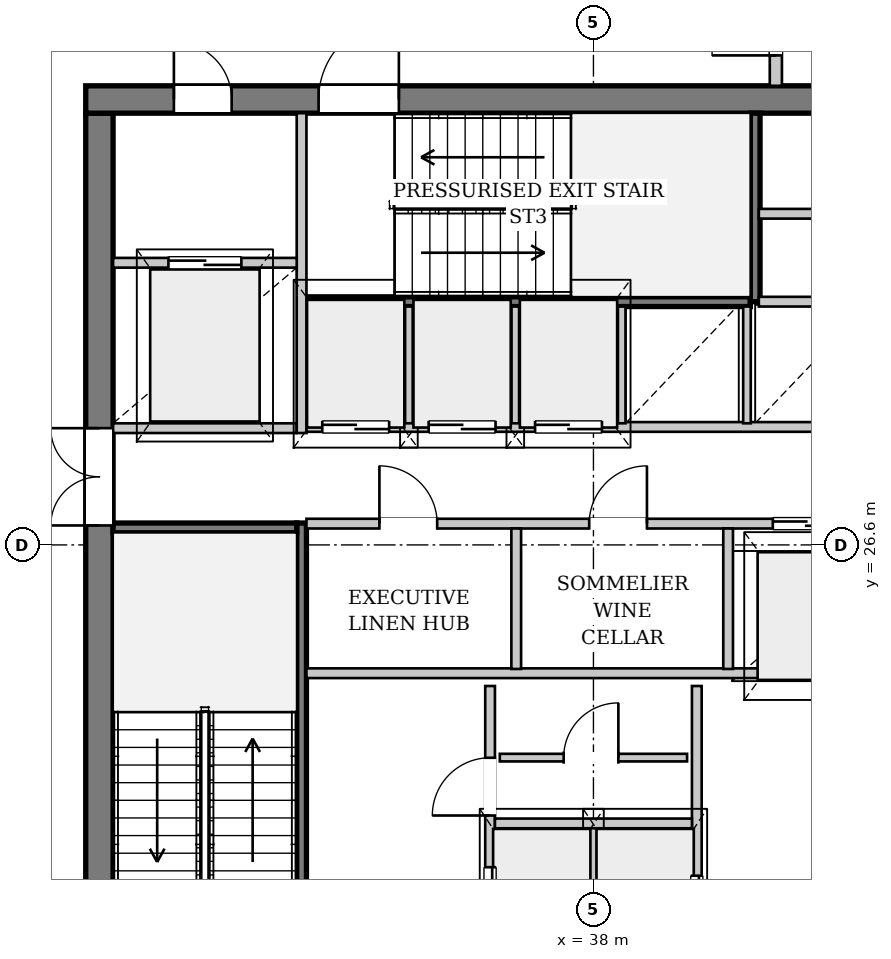
"""IFC4 building model, lengths in metres.
Left out: names, types, materials, properties, quantities, classifications, styles, units other than length and angle.
Written with IfcOpenShell. Run it as: python <this file> out.ifc"""

import sys

from ifc_helpers import new_model, si_unit, direction, frame, frame_2d, origin, place, context, subcontext, project, spatial, rectangle, extrude, source, transform, mapped, element, fill, save


model = new_model("IFC4")
c1 = context("Model", 3, precision=1e-05, world=origin(), true_north=direction((0.0, 1.0)))
c2 = subcontext(c1, "Body", "Model", "MODEL_VIEW")
j1 = project(units=[si_unit("LENGTHUNIT", "METRE"), si_unit("PLANEANGLEUNIT", "RADIAN")], contexts=[c1])
p1 = place(None, origin())
s1 = spatial("IfcSite", under=j1, at=p1, CompositionType="ELEMENT")
p2 = place(p1, origin())
s2 = spatial("IfcBuilding", under=s1, at=p2, CompositionType="ELEMENT")
p3 = place(p2, frame((0.0, 0.0, 234.5)))
s3 = spatial("IfcBuildingStorey", under=s2, at=p3, CompositionType="ELEMENT", Elevation=234.5)
p4 = place(p3, frame((15.502, 29.99, 0.0), z_axis=(0.0, 0.0, 1.0), x_axis=(0.862571881981, 0.505934529772, 0.0)))
e1 = element("IfcWall", 1, at=p4, inside=s3, PredefinedType="SOLIDWALL", context=c2, shape_type="SweptSolid", body=[
    extrude(rectangle(XDim=22.318, YDim=0.38, at=frame_2d((11.159, 0.0))), origin(), (0.0, 0.0, 1.0), 2.872),
])
p5 = place(p4, frame((5.149, 0.0, 0.502)))
e2 = element("IfcOpeningElement", 2, at=p5, cuts=e1, PredefinedType="OPENING", context=c2, shape_type="SweptSolid", body=[
    extrude(rectangle(XDim=2.2, YDim=2.25, at=frame_2d((1.1, 1.125))), frame((0.0, 0.2, 0.0), z_axis=(0.0, -1.0, 0.0), x_axis=(1.0, 0.0, 0.0)), (0.0, 0.0, 1.0), 0.4),
])
p6 = place(p4, frame((15.419, 0.0, 0.502)))
e3 = element("IfcOpeningElement", 3, at=p6, cuts=e1, PredefinedType="OPENING", context=c2, shape_type="SweptSolid", body=[
    extrude(rectangle(XDim=2.2, YDim=2.25, at=frame_2d((1.1, 1.125))), frame((0.0, 0.2, 0.0), z_axis=(0.0, -1.0, 0.0), x_axis=(1.0, 0.0, 0.0)), (0.0, 0.0, 1.0), 0.4),
])
p7 = place(p3, frame((29.875, 19.5, 0.0), z_axis=(0.0, 0.0, 1.0), x_axis=(0.0, 1.0, 0.0)))
e4 = element("IfcWall", 4, at=p7, inside=s3, PredefinedType="SHEAR", context=c2, shape_type="SweptSolid", body=[
    extrude(rectangle(XDim=14.2, YDim=0.45, at=frame_2d((7.1, 0.0))), origin(), (0.0, 0.0, 1.0), 3.38),
])
p8 = place(p7, frame((7.42, 0.0, 0.0)))
e5 = element("IfcOpeningElement", 5, at=p8, cuts=e4, PredefinedType="OPENING", context=c2, shape_type="SweptSolid", body=[
    extrude(rectangle(XDim=1.6, YDim=2.2, at=frame_2d((0.8, 1.1))), frame((0.0, 0.235, 0.0), z_axis=(0.0, -1.0, 0.0), x_axis=(1.0, 0.0, 0.0)), (0.0, 0.0, 1.0), 0.47),
])
p9 = place(p3, frame((29.65, 33.925, 0.0), z_axis=(0.0, 0.0, 1.0), x_axis=(1.0, 0.0, 0.0)))
e6 = element("IfcWall", 6, at=p9, inside=s3, PredefinedType="SHEAR", context=c2, shape_type="SweptSolid", body=[
    extrude(rectangle(XDim=16.7, YDim=0.45, at=frame_2d((8.35, 0.0))), origin(), (0.0, 0.0, 1.0), 3.38),
])
p10 = place(p9, frame((1.45, 0.0, 0.0)))
e7 = element("IfcOpeningElement", 7, at=p10, cuts=e6, PredefinedType="OPENING", context=c2, shape_type="SweptSolid", body=[
    extrude(rectangle(XDim=0.95, YDim=2.1, at=frame_2d((0.475, 1.05))), frame((0.0, 0.235, 0.0), z_axis=(0.0, -1.0, 0.0), x_axis=(1.0, 0.0, 0.0)), (0.0, 0.0, 1.0), 0.47),
])
p11 = place(p9, frame((3.83, 0.0, 0.0)))
e8 = element("IfcOpeningElement", 8, at=p11, cuts=e6, PredefinedType="OPENING", context=c2, shape_type="SweptSolid", body=[
    extrude(rectangle(XDim=1.32, YDim=2.2, at=frame_2d((0.66, 1.1))), frame((0.0, 0.235, 0.0), z_axis=(0.0, -1.0, 0.0), x_axis=(1.0, 0.0, 0.0)), (0.0, 0.0, 1.0), 0.47),
])
p12 = place(p3, frame((33.2, 19.5, 0.0), z_axis=(0.0, 0.0, 1.0), x_axis=(0.0, 1.0, 0.0)))
e9 = element("IfcWall", 9, at=p12, inside=s3, PredefinedType="PARTITIONING", context=c2, shape_type="SweptSolid", body=[
    extrude(rectangle(XDim=7.46, YDim=0.16, at=frame_2d((3.73, 0.0))), origin(), (0.0, 0.0, 1.0), 3.38),
])
p13 = place(p12, frame((0.08, 0.0, 0.0)))
e10 = element("IfcOpeningElement", 10, at=p13, cuts=e9, PredefinedType="OPENING", context=c2, shape_type="SweptSolid", body=[
    extrude(rectangle(XDim=1.32, YDim=2.2, at=frame_2d((0.66, 1.1))), frame((0.0, 0.09, 0.0), z_axis=(0.0, -1.0, 0.0), x_axis=(1.0, 0.0, 0.0)), (0.0, 0.0, 1.0), 0.18),
])
p14 = place(p3, frame((30.1, 26.88, 0.0), z_axis=(0.0, 0.0, 1.0), x_axis=(1.0, 0.0, 0.0)))
e11 = element("IfcWall", 11, at=p14, inside=s3, PredefinedType="PARTITIONING", context=c2, shape_type="SweptSolid", body=[
    extrude(rectangle(XDim=3.02, YDim=0.16, at=frame_2d((1.51, 0.0))), origin(), (0.0, 0.0, 1.0), 3.38),
])
p15 = place(p3, frame((33.28, 30.6, 0.0), z_axis=(0.0, 0.0, 1.0), x_axis=(1.0, 0.0, 0.0)))
e12 = element("IfcWall", 12, at=p15, inside=s3, PredefinedType="PARTITIONING", context=c2, shape_type="SweptSolid", body=[
    extrude(rectangle(XDim=7.3, YDim=0.16, at=frame_2d((3.65, 0.0))), origin(), (0.0, 0.0, 1.0), 3.38),
])
p16 = place(p3, frame((40.66, 30.6, 0.0), z_axis=(0.0, 0.0, 1.0), x_axis=(0.0, 1.0, 0.0)))
e13 = element("IfcWall", 13, at=p16, inside=s3, PredefinedType="PARTITIONING", context=c2, shape_type="SweptSolid", body=[
    extrude(rectangle(XDim=3.1, YDim=0.16, at=frame_2d((1.55, 0.0))), origin(), (0.0, 0.0, 1.0), 3.38),
])
p17 = place(p3, frame((36.3, 19.5, 0.0), z_axis=(0.0, 0.0, 1.0), x_axis=(0.0, 1.0, 0.0)))
e14 = element("IfcWall", 14, at=p17, inside=s3, PredefinedType="PARTITIONING", context=c2, shape_type="SweptSolid", body=[
    extrude(rectangle(XDim=4.78, YDim=0.16, at=frame_2d((2.39, 0.0))), origin(), (0.0, 0.0, 1.0), 3.38),
])
p18 = place(p17, frame((0.6, 0.0, 0.0)))
e15 = element("IfcOpeningElement", 15, at=p18, cuts=e14, PredefinedType="OPENING", context=c2, shape_type="SweptSolid", body=[
    extrude(rectangle(XDim=1.2, YDim=2.2, at=frame_2d((0.6, 1.1))), frame((0.0, 0.09, 0.0), z_axis=(0.0, -1.0, 0.0), x_axis=(1.0, 0.0, 0.0)), (0.0, 0.0, 1.0), 0.18),
])
p19 = place(p17, frame((2.65, 0.0, 0.0)))
e16 = element("IfcOpeningElement", 16, at=p19, cuts=e14, PredefinedType="OPENING", context=c2, shape_type="SweptSolid", body=[
    extrude(rectangle(XDim=0.95, YDim=2.1, at=frame_2d((0.475, 1.05))), frame((0.0, 0.09, 0.0), z_axis=(0.0, -1.0, 0.0), x_axis=(1.0, 0.0, 0.0)), (0.0, 0.0, 1.0), 0.18),
])
p20 = place(p3, frame((39.7, 24.28, 0.0), z_axis=(0.0, 0.0, 1.0), x_axis=(0.0, -1.0, 0.0)))
e17 = element("IfcWall", 17, at=p20, inside=s3, PredefinedType="PARTITIONING", context=c2, shape_type="SweptSolid", body=[
    extrude(rectangle(XDim=4.78, YDim=0.16, at=frame_2d((2.39, 0.0))), origin(), (0.0, 0.0, 1.0), 3.38),
])
p21 = place(p20, frame((3.12, 0.0, 0.0)))
e18 = element("IfcOpeningElement", 18, at=p21, cuts=e17, PredefinedType="OPENING", context=c2, shape_type="SweptSolid", body=[
    extrude(rectangle(XDim=1.2, YDim=2.2, at=frame_2d((0.6, 1.1))), frame((0.0, 0.09, 0.0), z_axis=(0.0, -1.0, 0.0), x_axis=(1.0, 0.0, 0.0)), (0.0, 0.0, 1.0), 0.18),
])
p22 = place(p3, frame((38.0, 19.5, 0.0), z_axis=(0.0, 0.0, 1.0), x_axis=(0.0, 1.0, 0.0)))
e19 = element("IfcWall", 19, at=p22, inside=s3, PredefinedType="PARTITIONING", context=c2, shape_type="SweptSolid", body=[
    extrude(rectangle(XDim=2.46, YDim=0.125, at=frame_2d((1.23, 0.0))), origin(), (0.0, 0.0, 1.0), 3.38),
])
p23 = place(p3, frame((36.38, 22.02, 0.0), z_axis=(0.0, 0.0, 1.0), x_axis=(1.0, 0.0, 0.0)))
e20 = element("IfcWall", 20, at=p23, inside=s3, PredefinedType="PARTITIONING", context=c2, shape_type="SweptSolid", body=[
    extrude(rectangle(XDim=3.24, YDim=0.16, at=frame_2d((1.62, 0.0))), origin(), (0.0, 0.0, 1.0), 3.38),
])
p24 = place(p3, frame((33.28, 24.49, 0.0), z_axis=(0.0, 0.0, 1.0), x_axis=(1.0, 0.0, 0.0)))
e21 = element("IfcWall", 21, at=p24, inside=s3, PredefinedType="PARTITIONING", context=c2, shape_type="SweptSolid", body=[
    extrude(rectangle(XDim=9.44, YDim=0.16, at=frame_2d((4.72, 0.0))), origin(), (0.0, 0.0, 1.0), 3.38),
])
p25 = place(p3, frame((36.46, 23.102, 0.0), z_axis=(0.0, 0.0, 1.0), x_axis=(1.0, 0.0, 0.0)))
e22 = element("IfcWall", 22, at=p25, inside=s3, PredefinedType="PARTITIONING", context=c2, shape_type="SweptSolid", body=[
    extrude(rectangle(XDim=3.08, YDim=0.125, at=frame_2d((1.54, 0.0))), origin(), (0.0, 0.0, 1.0), 3.38),
])
p26 = place(p25, frame((1.05, 0.0, 0.0)))
e23 = element("IfcOpeningElement", 23, at=p26, cuts=e22, PredefinedType="OPENING", context=c2, shape_type="SweptSolid", body=[
    extrude(rectangle(XDim=0.9, YDim=2.1, at=frame_2d((0.45, 1.05))), frame((0.0, 0.073, 0.0), z_axis=(0.0, -1.0, 0.0), x_axis=(1.0, 0.0, 0.0)), (0.0, 0.0, 1.0), 0.145),
])
p27 = place(p3, frame((30.1, 28.52, 0.0), z_axis=(0.0, 0.0, 1.0), x_axis=(1.0, 0.0, 0.0)))
e24 = element("IfcWall", 24, at=p27, inside=s3, PredefinedType="PARTITIONING", context=c2, shape_type="SweptSolid", body=[
    extrude(rectangle(XDim=3.02, YDim=0.16, at=frame_2d((1.51, 0.0))), origin(), (0.0, 0.0, 1.0), 3.38),
])
p28 = place(p3, frame((33.2, 28.44, 0.0), z_axis=(0.0, 0.0, 1.0), x_axis=(0.0, 1.0, 0.0)))
e25 = element("IfcWall", 25, at=p28, inside=s3, PredefinedType="PARTITIONING", context=c2, shape_type="SweptSolid", body=[
    extrude(rectangle(XDim=5.26, YDim=0.16, at=frame_2d((2.63, 0.0))), origin(), (0.0, 0.0, 1.0), 3.38),
])
p29 = place(p3, frame((30.1, 31.24, 0.0), z_axis=(0.0, 0.0, 1.0), x_axis=(1.0, 0.0, 0.0)))
e26 = element("IfcWall", 26, at=p29, inside=s3, PredefinedType="PARTITIONING", context=c2, shape_type="SweptSolid", body=[
    extrude(rectangle(XDim=3.02, YDim=0.16, at=frame_2d((1.51, 0.0))), origin(), (0.0, 0.0, 1.0), 3.38),
])
p30 = place(p29, frame((0.91, 0.0, 0.0)))
e27 = element("IfcOpeningElement", 27, at=p30, cuts=e26, PredefinedType="OPENING", context=c2, shape_type="SweptSolid", body=[
    extrude(rectangle(XDim=1.2, YDim=2.2, at=frame_2d((0.6, 1.1))), frame((0.0, 0.09, 0.0), z_axis=(0.0, -1.0, 0.0), x_axis=(1.0, 0.0, 0.0)), (0.0, 0.0, 1.0), 0.18),
])
p31 = place(p3, frame((33.28, 26.95, 0.0), z_axis=(0.0, 0.0, 1.0), x_axis=(1.0, 0.0, 0.0)))
e28 = element("IfcWall", 28, at=p31, inside=s3, PredefinedType="PARTITIONING", context=c2, shape_type="SweptSolid", body=[
    extrude(rectangle(XDim=9.44, YDim=0.16, at=frame_2d((4.72, 0.0))), origin(), (0.0, 0.0, 1.0), 3.38),
])
p32 = place(p31, frame((1.2, 0.0, 0.0)))
e29 = element("IfcOpeningElement", 29, at=p32, cuts=e28, PredefinedType="OPENING", context=c2, shape_type="SweptSolid", body=[
    extrude(rectangle(XDim=0.95, YDim=2.1, at=frame_2d((0.475, 1.05))), frame((0.0, 0.09, 0.0), z_axis=(0.0, -1.0, 0.0), x_axis=(1.0, 0.0, 0.0)), (0.0, 0.0, 1.0), 0.18),
])
p33 = place(p31, frame((4.65, 0.0, 0.0)))
e30 = element("IfcOpeningElement", 30, at=p33, cuts=e28, PredefinedType="OPENING", context=c2, shape_type="SweptSolid", body=[
    extrude(rectangle(XDim=0.95, YDim=2.1, at=frame_2d((0.475, 1.05))), frame((0.0, 0.09, 0.0), z_axis=(0.0, -1.0, 0.0), x_axis=(1.0, 0.0, 0.0)), (0.0, 0.0, 1.0), 0.18),
])
p34 = place(p31, frame((7.67, 0.0, 0.0)))
e31 = element("IfcOpeningElement", 31, at=p34, cuts=e28, PredefinedType="OPENING", context=c2, shape_type="SweptSolid", body=[
    extrude(rectangle(XDim=1.1, YDim=2.2, at=frame_2d((0.55, 1.1))), frame((0.0, 0.09, 0.0), z_axis=(0.0, -1.0, 0.0), x_axis=(1.0, 0.0, 0.0)), (0.0, 0.0, 1.0), 0.18),
])
for number, where, z_axis, x_axis in (
    (32, (36.73, 24.56, 0.0), (0.0, 0.0, 1.0), (0.0, 1.0, 0.0)),
    (33, (40.215, 24.56, 0.0), (0.0, 0.0, 1.0), (0.0, 1.0, 0.0)),
):
    element("IfcWall", number, at=place(p3, frame(where, z_axis=z_axis, x_axis=x_axis)), inside=s3, PredefinedType="PARTITIONING", context=c2, shape_type="SweptSolid", body=[
        extrude(rectangle(XDim=2.31, YDim=0.16, at=frame_2d((1.155, 0.0))), origin(), (0.0, 0.0, 1.0), 3.38),
    ])
p35 = place(p3, frame((33.28, 28.54, 0.0), z_axis=(0.0, 0.0, 1.0), x_axis=(1.0, 0.0, 0.0)))
e34 = element("IfcWall", 34, at=p35, inside=s3, PredefinedType="PARTITIONING", context=c2, shape_type="SweptSolid", body=[
    extrude(rectangle(XDim=12.62, YDim=0.16, at=frame_2d((6.31, 0.0))), origin(), (0.0, 0.0, 1.0), 3.38),
])
p36 = place(p35, frame((0.26, 0.0, 0.0)))
e35 = element("IfcOpeningElement", 35, at=p36, cuts=e34, PredefinedType="OPENING", context=c2, shape_type="SweptSolid", body=[
    extrude(rectangle(XDim=1.1, YDim=2.2, at=frame_2d((0.55, 1.1))), frame((0.0, 0.09, 0.0), z_axis=(0.0, -1.0, 0.0), x_axis=(1.0, 0.0, 0.0)), (0.0, 0.0, 1.0), 0.18),
])
p37 = place(p35, frame((2.01, 0.0, 0.0)))
e36 = element("IfcOpeningElement", 36, at=p37, cuts=e34, PredefinedType="OPENING", context=c2, shape_type="SweptSolid", body=[
    extrude(rectangle(XDim=1.1, YDim=2.2, at=frame_2d((0.55, 1.1))), frame((0.0, 0.09, 0.0), z_axis=(0.0, -1.0, 0.0), x_axis=(1.0, 0.0, 0.0)), (0.0, 0.0, 1.0), 0.18),
])
p38 = place(p35, frame((3.76, 0.0, 0.0)))
e37 = element("IfcOpeningElement", 37, at=p38, cuts=e34, PredefinedType="OPENING", context=c2, shape_type="SweptSolid", body=[
    extrude(rectangle(XDim=1.1, YDim=2.2, at=frame_2d((0.55, 1.1))), frame((0.0, 0.09, 0.0), z_axis=(0.0, -1.0, 0.0), x_axis=(1.0, 0.0, 0.0)), (0.0, 0.0, 1.0), 0.18),
])
p39 = place(p3, frame((40.72, 30.6, 0.0), z_axis=(0.0, 0.0, 1.0), x_axis=(1.0, 0.0, 0.0)))
e38 = element("IfcWall", 38, at=p39, inside=s3, PredefinedType="PARTITIONING", context=c2, shape_type="SweptSolid", body=[
    extrude(rectangle(XDim=5.18, YDim=0.16, at=frame_2d((2.59, 0.0))), origin(), (0.0, 0.0, 1.0), 3.38),
])
for number, where, z_axis, x_axis in (
    (39, (34.965, 28.6, 0.0), (0.0, 0.0, 1.0), (0.0, 1.0, 0.0)),
    (40, (36.715, 28.6, 0.0), (0.0, 0.0, 1.0), (0.0, 1.0, 0.0)),
    (41, (38.465, 28.6, 0.0), (0.0, 0.0, 1.0), (0.0, 1.0, 0.0)),
    (42, (40.525, 28.6, 0.0), (0.0, 0.0, 1.0), (0.0, 1.0, 0.0)),
):
    element("IfcWall", number, at=place(p3, frame(where, z_axis=z_axis, x_axis=x_axis)), inside=s3, PredefinedType="PARTITIONING", context=c2, shape_type="SweptSolid", body=[
        extrude(rectangle(XDim=1.92, YDim=0.125, at=frame_2d((0.96, 0.0))), origin(), (0.0, 0.0, 1.0), 3.38),
    ])
p40 = place(p3, frame((40.72, 32.046, 0.0), z_axis=(0.0, 0.0, 1.0), x_axis=(1.0, 0.0, 0.0)))
e43 = element("IfcWall", 43, at=p40, inside=s3, PredefinedType="PARTITIONING", context=c2, shape_type="SweptSolid", body=[
    extrude(rectangle(XDim=5.03, YDim=0.16, at=frame_2d((2.515, 0.0))), origin(), (0.0, 0.0, 1.0), 3.38),
])
p41 = place(p40, frame((2.1, 0.0, 0.0)))
e44 = element("IfcOpeningElement", 44, at=p41, cuts=e43, PredefinedType="OPENING", context=c2, shape_type="SweptSolid", body=[
    extrude(rectangle(XDim=0.95, YDim=2.1, at=frame_2d((0.475, 1.05))), frame((0.0, 0.09, 0.0), z_axis=(0.0, -1.0, 0.0), x_axis=(1.0, 0.0, 0.0)), (0.0, 0.0, 1.0), 0.18),
])
p42 = place(p3, frame((41.0, 34.15, 0.0), z_axis=(0.0, 0.0, 1.0), x_axis=(0.0, 1.0, 0.0)))
e45 = element("IfcWall", 45, at=p42, inside=s3, PredefinedType="PARTITIONING", context=c2, shape_type="SweptSolid", body=[
    extrude(rectangle(XDim=1.85, YDim=0.2, at=frame_2d((0.925, 0.0))), origin(), (0.0, 0.0, 1.0), 3.38),
])
p43 = place(p42, frame((0.5, 0.0, 0.0)))
e46 = element("IfcOpeningElement", 46, at=p43, cuts=e45, PredefinedType="OPENING", context=c2, shape_type="SweptSolid", body=[
    extrude(rectangle(XDim=1.05, YDim=2.2, at=frame_2d((0.525, 1.1))), frame((0.0, 0.11, 0.0), z_axis=(0.0, -1.0, 0.0), x_axis=(1.0, 0.0, 0.0)), (0.0, 0.0, 1.0), 0.22),
])
m1 = source(origin(), c2, "Body", "SweptSolid", [
    extrude(rectangle(XDim=1.6, YDim=2.2, at=frame_2d((0.8, 1.1))), frame((0.0, 0.025, 0.0), z_axis=(0.0, -1.0, 0.0), x_axis=(1.0, 0.0, 0.0)), (0.0, 0.0, 1.0), 0.05),
])
p44 = place(p8, origin())
e47 = element("IfcDoor", 47, at=p44, inside=s3, OperationType="DOUBLE_DOOR_SINGLE_SWING", PredefinedType="DOOR", context=c2, shape_type="MappedRepresentation", body=[
    mapped(m1, transform((0.0, 0.0, 0.0), x_axis=(1.0, 0.0, 0.0), y_axis=(0.0, 1.0, 0.0), z_axis=(0.0, 0.0, 1.0), scale=1.0)),
])
fill(e5, e47)
m2 = source(origin(), c2, "Body", "SweptSolid", [
    extrude(rectangle(XDim=0.95, YDim=2.1, at=frame_2d((0.475, 1.05))), frame((0.0, 0.025, 0.0), z_axis=(0.0, -1.0, 0.0), x_axis=(1.0, 0.0, 0.0)), (0.0, 0.0, 1.0), 0.05),
])
p45 = place(p10, origin())
e48 = element("IfcDoor", 48, at=p45, inside=s3, OperationType="SINGLE_SWING_LEFT", PredefinedType="DOOR", context=c2, shape_type="MappedRepresentation", body=[
    mapped(m2, transform((0.0, 0.0, 0.0), x_axis=(1.0, 0.0, 0.0), y_axis=(0.0, 1.0, 0.0), z_axis=(0.0, 0.0, 1.0), scale=1.0)),
])
fill(e7, e48)
m3 = source(origin(), c2, "Body", "SweptSolid", [
    extrude(rectangle(XDim=1.32, YDim=2.2, at=frame_2d((0.66, 1.1))), frame((0.0, 0.025, 0.0), z_axis=(0.0, -1.0, 0.0), x_axis=(1.0, 0.0, 0.0)), (0.0, 0.0, 1.0), 0.05),
])
p46 = place(p11, origin())
e49 = element("IfcDoor", 49, at=p46, inside=s3, OperationType="SINGLE_SWING_RIGHT", PredefinedType="DOOR", context=c2, shape_type="MappedRepresentation", body=[
    mapped(m3, transform((0.0, 0.0, 0.0), x_axis=(1.0, 0.0, 0.0), y_axis=(0.0, 1.0, 0.0), z_axis=(0.0, 0.0, 1.0), scale=1.0)),
])
fill(e8, e49)
m4 = source(origin(), c2, "Body", "SweptSolid", [
    extrude(rectangle(XDim=1.2, YDim=2.2, at=frame_2d((0.6, 1.1))), frame((0.0, 0.025, 0.0), z_axis=(0.0, -1.0, 0.0), x_axis=(1.0, 0.0, 0.0)), (0.0, 0.0, 1.0), 0.05),
])
p47 = place(p18, origin())
e50 = element("IfcDoor", 50, at=p47, inside=s3, OperationType="DOUBLE_DOOR_SLIDING", PredefinedType="DOOR", context=c2, shape_type="MappedRepresentation", body=[
    mapped(m4, transform((0.0, 0.0, 0.0), x_axis=(1.0, 0.0, 0.0), y_axis=(0.0, 1.0, 0.0), z_axis=(0.0, 0.0, 1.0), scale=1.0)),
])
fill(e15, e50)
p48 = place(p19, origin())
e51 = element("IfcDoor", 51, at=p48, inside=s3, OperationType="SINGLE_SWING_LEFT", PredefinedType="DOOR", context=c2, shape_type="MappedRepresentation", body=[
    mapped(m2, transform((0.0, 0.0, 0.0), x_axis=(1.0, 0.0, 0.0), y_axis=(0.0, 1.0, 0.0), z_axis=(0.0, 0.0, 1.0), scale=1.0)),
])
fill(e16, e51)
m5 = source(origin(), c2, "Body", "SweptSolid", [
    extrude(rectangle(XDim=0.9, YDim=2.1, at=frame_2d((0.45, 1.05))), frame((0.0, 0.025, 0.0), z_axis=(0.0, -1.0, 0.0), x_axis=(1.0, 0.0, 0.0)), (0.0, 0.0, 1.0), 0.05),
])
p49 = place(p26, origin())
e52 = element("IfcDoor", 52, at=p49, inside=s3, OperationType="SINGLE_SWING_RIGHT", PredefinedType="DOOR", context=c2, shape_type="MappedRepresentation", body=[
    mapped(m5, transform((0.0, 0.0, 0.0), x_axis=(1.0, 0.0, 0.0), y_axis=(0.0, 1.0, 0.0), z_axis=(0.0, 0.0, 1.0), scale=1.0)),
])
fill(e23, e52)
p50 = place(p21, origin())
e53 = element("IfcDoor", 53, at=p50, inside=s3, OperationType="DOUBLE_DOOR_SLIDING", PredefinedType="DOOR", context=c2, shape_type="MappedRepresentation", body=[
    mapped(m4, transform((0.0, 0.0, 0.0), x_axis=(1.0, 0.0, 0.0), y_axis=(0.0, 1.0, 0.0), z_axis=(0.0, 0.0, 1.0), scale=1.0)),
])
fill(e18, e53)
p51 = place(p30, origin())
e54 = element("IfcDoor", 54, at=p51, inside=s3, OperationType="DOUBLE_DOOR_SLIDING", PredefinedType="DOOR", context=c2, shape_type="MappedRepresentation", body=[
    mapped(m4, transform((0.0, 0.0, 0.0), x_axis=(1.0, 0.0, 0.0), y_axis=(0.0, 1.0, 0.0), z_axis=(0.0, 0.0, 1.0), scale=1.0)),
])
fill(e27, e54)
p52 = place(p32, origin())
e55 = element("IfcDoor", 55, at=p52, inside=s3, OperationType="SINGLE_SWING_LEFT", PredefinedType="DOOR", context=c2, shape_type="MappedRepresentation", body=[
    mapped(m2, transform((0.0, 0.0, 0.0), x_axis=(1.0, 0.0, 0.0), y_axis=(0.0, 1.0, 0.0), z_axis=(0.0, 0.0, 1.0), scale=1.0)),
])
fill(e29, e55)
p53 = place(p33, origin())
e56 = element("IfcDoor", 56, at=p53, inside=s3, OperationType="SINGLE_SWING_RIGHT", PredefinedType="DOOR", context=c2, shape_type="MappedRepresentation", body=[
    mapped(m2, transform((0.0, 0.0, 0.0), x_axis=(1.0, 0.0, 0.0), y_axis=(0.0, 1.0, 0.0), z_axis=(0.0, 0.0, 1.0), scale=1.0)),
])
fill(e30, e56)
m6 = source(origin(), c2, "Body", "SweptSolid", [
    extrude(rectangle(XDim=1.1, YDim=2.2, at=frame_2d((0.55, 1.1))), frame((0.0, 0.025, 0.0), z_axis=(0.0, -1.0, 0.0), x_axis=(1.0, 0.0, 0.0)), (0.0, 0.0, 1.0), 0.05),
])
p54 = place(p34, origin())
e57 = element("IfcDoor", 57, at=p54, inside=s3, OperationType="DOUBLE_DOOR_SLIDING", PredefinedType="DOOR", context=c2, shape_type="MappedRepresentation", body=[
    mapped(m6, transform((0.0, 0.0, 0.0), x_axis=(1.0, 0.0, 0.0), y_axis=(0.0, 1.0, 0.0), z_axis=(0.0, 0.0, 1.0), scale=1.0)),
])
fill(e31, e57)
p55 = place(p36, origin())
e58 = element("IfcDoor", 58, at=p55, inside=s3, OperationType="DOUBLE_DOOR_SLIDING", PredefinedType="DOOR", context=c2, shape_type="MappedRepresentation", body=[
    mapped(m6, transform((0.0, 0.0, 0.0), x_axis=(1.0, 0.0, 0.0), y_axis=(0.0, 1.0, 0.0), z_axis=(0.0, 0.0, 1.0), scale=1.0)),
])
fill(e35, e58)
p56 = place(p37, origin())
e59 = element("IfcDoor", 59, at=p56, inside=s3, OperationType="DOUBLE_DOOR_SLIDING", PredefinedType="DOOR", context=c2, shape_type="MappedRepresentation", body=[
    mapped(m6, transform((0.0, 0.0, 0.0), x_axis=(1.0, 0.0, 0.0), y_axis=(0.0, 1.0, 0.0), z_axis=(0.0, 0.0, 1.0), scale=1.0)),
])
fill(e36, e59)
p57 = place(p38, origin())
e60 = element("IfcDoor", 60, at=p57, inside=s3, OperationType="DOUBLE_DOOR_SLIDING", PredefinedType="DOOR", context=c2, shape_type="MappedRepresentation", body=[
    mapped(m6, transform((0.0, 0.0, 0.0), x_axis=(1.0, 0.0, 0.0), y_axis=(0.0, 1.0, 0.0), z_axis=(0.0, 0.0, 1.0), scale=1.0)),
])
fill(e37, e60)
m7 = source(origin(), c2, "Body", "SweptSolid", [
    extrude(rectangle(XDim=1.05, YDim=2.2, at=frame_2d((0.525, 1.1))), frame((0.0, 0.025, 0.0), z_axis=(0.0, -1.0, 0.0), x_axis=(1.0, 0.0, 0.0)), (0.0, 0.0, 1.0), 0.05),
])
p58 = place(p43, origin())
e61 = element("IfcDoor", 61, at=p58, inside=s3, OperationType="SINGLE_SWING_LEFT", PredefinedType="DOOR", context=c2, shape_type="MappedRepresentation", body=[
    mapped(m7, transform((0.0, 0.0, 0.0), x_axis=(1.0, 0.0, 0.0), y_axis=(0.0, 1.0, 0.0), z_axis=(0.0, 0.0, 1.0), scale=1.0)),
])
fill(e46, e61)
save(model, sys.argv[1])
